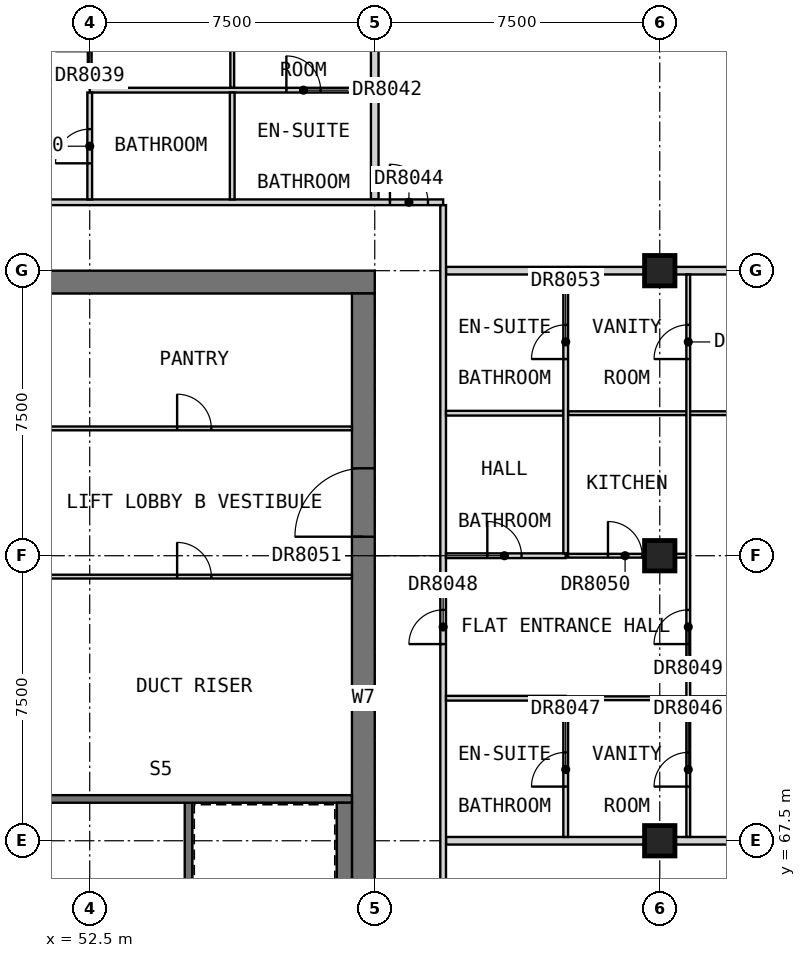
"""IFC4 building model, lengths in metres.
Left out: names, types, materials, properties, quantities, classifications, styles, units other than length and angle.
Written with IfcOpenShell. Run it as: python <this file> out.ifc"""

import sys

from ifc_helpers import new_model, si_unit, direction, frame, frame_2d, origin, origin_2d, place, context, subcontext, project, spatial, rectangle, extrude, element, fill, save


model = new_model("IFC4")
c1 = context("Model", 3, precision=1e-05, world=origin(), true_north=direction((0.0, 1.0)))
c2 = subcontext(c1, "Body", "Model", "MODEL_VIEW")
j1 = project(units=[si_unit("LENGTHUNIT", "METRE"), si_unit("PLANEANGLEUNIT", "RADIAN")], contexts=[c1])
p1 = place(None, origin())
s1 = spatial("IfcSite", under=j1, at=p1, CompositionType="ELEMENT")
p2 = place(p1, origin())
s2 = spatial("IfcBuilding", under=s1, at=p2, CompositionType="ELEMENT")
p3 = place(p2, frame((0.0, 0.0, 233.7)))
s3 = spatial("IfcBuildingStorey", under=s2, at=p3, CompositionType="ELEMENT", Elevation=233.7)
for number, where, z_axis, x_axis in (
    (1, (67.5, 67.5, 0.0), (0.0, 0.0, 1.0), (1.0, 0.0, 0.0)),
    (2, (67.5, 75.0, 0.0), (0.0, 0.0, 1.0), (1.0, 0.0, 0.0)),
    (3, (67.5, 82.5, 0.0), (0.0, 0.0, 1.0), (1.0, 0.0, 0.0)),
):
    element("IfcColumn", number, at=place(p3, frame(where, z_axis=z_axis, x_axis=x_axis)), inside=s3, PredefinedType="COLUMN", context=c2, shape_type="SweptSolid", body=[
        extrude(rectangle(XDim=0.8, YDim=0.8, at=origin_2d()), origin(), (0.0, 0.0, 1.0), 3.5),
    ])
p4 = place(p3, frame((30.0, 82.2, 0.0), z_axis=(0.0, 0.0, 1.0), x_axis=(1.0, 0.0, 0.0)))
e4 = element("IfcWall", 4, at=p4, inside=s3, PredefinedType="SHEAR", context=c2, shape_type="SweptSolid", body=[
    extrude(rectangle(XDim=30.0, YDim=0.6, at=frame_2d((15.0, 0.0))), origin(), (0.0, 0.0, 1.0), 3.5),
])
p5 = place(p3, frame((59.7, 60.6, 0.0), z_axis=(0.0, 0.0, 1.0), x_axis=(0.0, 1.0, 0.0)))
e5 = element("IfcWall", 5, at=p5, inside=s3, PredefinedType="SHEAR", context=c2, shape_type="SweptSolid", body=[
    extrude(rectangle(XDim=21.3, YDim=0.6, at=frame_2d((10.65, 0.0))), origin(), (0.0, 0.0, 1.0), 3.5),
])
p6 = place(p5, frame((14.9, 0.0, 0.0)))
e6 = element("IfcOpeningElement", 6, at=p6, cuts=e5, PredefinedType="OPENING", context=c2, shape_type="SweptSolid", body=[
    extrude(rectangle(XDim=1.8, YDim=2.1, at=frame_2d((0.9, 1.05))), frame((0.0, 0.31, 0.0), z_axis=(0.0, -1.0, 0.0), x_axis=(1.0, 0.0, 0.0)), (0.0, 0.0, 1.0), 0.62),
])
p7 = place(p3, frame((55.1, 60.6, 0.0), z_axis=(0.0, 0.0, 1.0), x_axis=(0.0, 1.0, 0.0)))
e7 = element("IfcWall", 7, at=p7, inside=s3, PredefinedType="SOLIDWALL", context=c2, shape_type="SweptSolid", body=[
    extrude(rectangle(XDim=8.0, YDim=0.2, at=frame_2d((4.0, 0.0))), origin(), (0.0, 0.0, 1.0), 3.25),
])
p8 = place(p3, frame((51.1, 68.6, 0.0), z_axis=(0.0, 0.0, 1.0), x_axis=(1.0, 0.0, 0.0)))
e8 = element("IfcWall", 8, at=p8, inside=s3, PredefinedType="SOLIDWALL", context=c2, shape_type="SweptSolid", body=[
    extrude(rectangle(XDim=8.3, YDim=0.2, at=frame_2d((4.15, 0.0))), origin(), (0.0, 0.0, 1.0), 3.25),
])
p9 = place(p3, frame((59.2, 60.6, 0.0), z_axis=(0.0, 0.0, 1.0), x_axis=(0.0, 1.0, 0.0)))
e9 = element("IfcWall", 9, at=p9, inside=s3, PredefinedType="SOLIDWALL", context=c2, shape_type="SweptSolid", body=[
    extrude(rectangle(XDim=7.9, YDim=0.4, at=frame_2d((3.95, 0.0))), origin(), (0.0, 0.0, 1.0), 3.25),
])
p10 = place(p3, frame((51.1, 74.45, 0.0), z_axis=(0.0, 0.0, 1.0), x_axis=(1.0, 0.0, 0.0)))
e10 = element("IfcWall", 10, at=p10, inside=s3, PredefinedType="PARTITIONING", context=c2, shape_type="SweptSolid", body=[
    extrude(rectangle(XDim=8.3, YDim=0.1, at=frame_2d((4.15, 0.0))), origin(), (0.0, 0.0, 1.0), 3.25),
])
p11 = place(p10, frame((3.7, 0.0, 0.0)))
e11 = element("IfcOpeningElement", 11, at=p11, cuts=e10, PredefinedType="OPENING", context=c2, shape_type="SweptSolid", body=[
    extrude(rectangle(XDim=0.9, YDim=2.1, at=frame_2d((0.45, 1.05))), frame((0.0, 0.06, 0.0), z_axis=(0.0, -1.0, 0.0), x_axis=(1.0, 0.0, 0.0)), (0.0, 0.0, 1.0), 0.12),
])
p12 = place(p3, frame((51.1, 78.35, 0.0), z_axis=(0.0, 0.0, 1.0), x_axis=(1.0, 0.0, 0.0)))
e12 = element("IfcWall", 12, at=p12, inside=s3, PredefinedType="PARTITIONING", context=c2, shape_type="SweptSolid", body=[
    extrude(rectangle(XDim=8.3, YDim=0.1, at=frame_2d((4.15, 0.0))), origin(), (0.0, 0.0, 1.0), 3.25),
])
p13 = place(p12, frame((3.7, 0.0, 0.0)))
e13 = element("IfcOpeningElement", 13, at=p13, cuts=e12, PredefinedType="OPENING", context=c2, shape_type="SweptSolid", body=[
    extrude(rectangle(XDim=0.9, YDim=2.1, at=frame_2d((0.45, 1.05))), frame((0.0, 0.06, 0.0), z_axis=(0.0, -1.0, 0.0), x_axis=(1.0, 0.0, 0.0)), (0.0, 0.0, 1.0), 0.12),
])
for number, where, z_axis, x_axis in (
    (14, (61.875, 67.5, 0.0), (0.0, 0.0, 1.0), (1.0, 0.0, 0.0)),
    (15, (61.875, 82.5, 0.0), (0.0, 0.0, 1.0), (1.0, 0.0, 0.0)),
):
    element("IfcWall", number, at=place(p3, frame(where, z_axis=z_axis, x_axis=x_axis)), inside=s3, PredefinedType="PARTITIONING", context=c2, shape_type="SweptSolid", body=[
        extrude(rectangle(XDim=16.875, YDim=0.2, at=frame_2d((8.438, 0.0))), origin(), (0.0, 0.0, 1.0), 3.25),
    ])
p14 = place(p3, frame((60.0, 84.375, 0.0), z_axis=(0.0, 0.0, 1.0), x_axis=(0.0, 1.0, 0.0)))
e16 = element("IfcWall", 16, at=p14, inside=s3, PredefinedType="PARTITIONING", context=c2, shape_type="SweptSolid", body=[
    extrude(rectangle(XDim=13.125, YDim=0.2, at=frame_2d((6.562, 0.0))), origin(), (0.0, 0.0, 1.0), 3.25),
])
p15 = place(p3, frame((33.85, 84.3, 0.0), z_axis=(0.0, 0.0, 1.0), x_axis=(1.0, 0.0, 0.0)))
e17 = element("IfcWall", 17, at=p15, inside=s3, PredefinedType="PARTITIONING", context=c2, shape_type="SweptSolid", body=[
    extrude(rectangle(XDim=27.95, YDim=0.15, at=frame_2d((13.975, 0.0))), origin(), (0.0, 0.0, 1.0), 3.25),
])
p16 = place(p15, frame((1.325, 0.0, 0.0)))
e18 = element("IfcOpeningElement", 18, at=p16, cuts=e17, PredefinedType="OPENING", context=c2, shape_type="SweptSolid", body=[
    extrude(rectangle(XDim=0.9, YDim=2.1, at=frame_2d((0.45, 1.05))), frame((0.0, 0.085, 0.0), z_axis=(0.0, -1.0, 0.0), x_axis=(1.0, 0.0, 0.0)), (0.0, 0.0, 1.0), 0.17),
])
p17 = place(p15, frame((8.825, 0.0, 0.0)))
e19 = element("IfcOpeningElement", 19, at=p17, cuts=e17, PredefinedType="OPENING", context=c2, shape_type="SweptSolid", body=[
    extrude(rectangle(XDim=0.9, YDim=2.1, at=frame_2d((0.45, 1.05))), frame((0.0, 0.085, 0.0), z_axis=(0.0, -1.0, 0.0), x_axis=(1.0, 0.0, 0.0)), (0.0, 0.0, 1.0), 0.17),
])
p18 = place(p15, frame((16.325, 0.0, 0.0)))
e20 = element("IfcOpeningElement", 20, at=p18, cuts=e17, PredefinedType="OPENING", context=c2, shape_type="SweptSolid", body=[
    extrude(rectangle(XDim=0.9, YDim=2.1, at=frame_2d((0.45, 1.05))), frame((0.0, 0.085, 0.0), z_axis=(0.0, -1.0, 0.0), x_axis=(1.0, 0.0, 0.0)), (0.0, 0.0, 1.0), 0.17),
])
p19 = place(p15, frame((26.55, 0.0, 0.0)))
e21 = element("IfcOpeningElement", 21, at=p19, cuts=e17, PredefinedType="OPENING", context=c2, shape_type="SweptSolid", body=[
    extrude(rectangle(XDim=1.0, YDim=2.1, at=frame_2d((0.5, 1.05))), frame((0.0, 0.085, 0.0), z_axis=(0.0, -1.0, 0.0), x_axis=(1.0, 0.0, 0.0)), (0.0, 0.0, 1.0), 0.17),
])
p20 = place(p3, frame((61.8, 58.275, 0.0), z_axis=(0.0, 0.0, 1.0), x_axis=(0.0, 1.0, 0.0)))
e22 = element("IfcWall", 22, at=p20, inside=s3, PredefinedType="PARTITIONING", context=c2, shape_type="SweptSolid", body=[
    extrude(rectangle(XDim=25.95, YDim=0.15, at=frame_2d((12.975, 0.0))), origin(), (0.0, 0.0, 1.0), 3.25),
])
p21 = place(p20, frame((4.575, 0.0, 0.0)))
e23 = element("IfcOpeningElement", 23, at=p21, cuts=e22, PredefinedType="OPENING", context=c2, shape_type="SweptSolid", body=[
    extrude(rectangle(XDim=1.8, YDim=2.1, at=frame_2d((0.9, 1.05))), frame((0.0, 0.085, 0.0), z_axis=(0.0, -1.0, 0.0), x_axis=(1.0, 0.0, 0.0)), (0.0, 0.0, 1.0), 0.17),
])
p22 = place(p20, frame((14.4, 0.0, 0.0)))
e24 = element("IfcOpeningElement", 24, at=p22, cuts=e22, PredefinedType="OPENING", context=c2, shape_type="SweptSolid", body=[
    extrude(rectangle(XDim=0.9, YDim=2.1, at=frame_2d((0.45, 1.05))), frame((0.0, 0.085, 0.0), z_axis=(0.0, -1.0, 0.0), x_axis=(1.0, 0.0, 0.0)), (0.0, 0.0, 1.0), 0.17),
])
p23 = place(p3, frame((65.087, 71.25, 0.0), z_axis=(0.0, 0.0, 1.0), x_axis=(1.0, 0.0, 0.0)))
e25 = element("IfcWall", 25, at=p23, inside=s3, PredefinedType="PARTITIONING", context=c2, shape_type="SweptSolid", body=[
    extrude(rectangle(XDim=12.853, YDim=0.1, at=frame_2d((6.426, 0.0))), origin(), (0.0, 0.0, 1.0), 3.25),
])
p24 = place(p23, frame((7.962, 0.0, 0.0)))
e26 = element("IfcOpeningElement", 26, at=p24, cuts=e25, PredefinedType="OPENING", context=c2, shape_type="SweptSolid", body=[
    extrude(rectangle(XDim=0.9, YDim=2.1, at=frame_2d((0.45, 1.05))), frame((0.0, 0.06, 0.0), z_axis=(0.0, -1.0, 0.0), x_axis=(1.0, 0.0, 0.0)), (0.0, 0.0, 1.0), 0.12),
])
p25 = place(p3, frame((65.087, 75.0, 0.0), z_axis=(0.0, 0.0, 1.0), x_axis=(1.0, 0.0, 0.0)))
e27 = element("IfcWall", 27, at=p25, inside=s3, PredefinedType="PARTITIONING", context=c2, shape_type="SweptSolid", body=[
    extrude(rectangle(XDim=3.113, YDim=0.1, at=frame_2d((1.556, 0.0))), origin(), (0.0, 0.0, 1.0), 3.25),
])
p26 = place(p25, frame((1.05, 0.0, 0.0)))
e28 = element("IfcOpeningElement", 28, at=p26, cuts=e27, PredefinedType="OPENING", context=c2, shape_type="SweptSolid", body=[
    extrude(rectangle(XDim=0.9, YDim=2.1, at=frame_2d((0.45, 1.05))), frame((0.0, 0.06, 0.0), z_axis=(0.0, -1.0, 0.0), x_axis=(1.0, 0.0, 0.0)), (0.0, 0.0, 1.0), 0.12),
])
p27 = place(p3, frame((65.087, 78.75, 0.0), z_axis=(0.0, 0.0, 1.0), x_axis=(1.0, 0.0, 0.0)))
e29 = element("IfcWall", 29, at=p27, inside=s3, PredefinedType="PARTITIONING", context=c2, shape_type="SweptSolid", body=[
    extrude(rectangle(XDim=12.853, YDim=0.1, at=frame_2d((6.426, 0.0))), origin(), (0.0, 0.0, 1.0), 3.25),
])
p28 = place(p27, frame((7.962, 0.0, 0.0)))
e30 = element("IfcOpeningElement", 30, at=p28, cuts=e29, PredefinedType="OPENING", context=c2, shape_type="SweptSolid", body=[
    extrude(rectangle(XDim=0.9, YDim=2.1, at=frame_2d((0.45, 1.05))), frame((0.0, 0.06, 0.0), z_axis=(0.0, -1.0, 0.0), x_axis=(1.0, 0.0, 0.0)), (0.0, 0.0, 1.0), 0.12),
])
p29 = place(p3, frame((52.5, 87.312, 0.0), z_axis=(0.0, 0.0, 1.0), x_axis=(0.0, 1.0, 0.0)))
e31 = element("IfcWall", 31, at=p29, inside=s3, PredefinedType="PARTITIONING", context=c2, shape_type="SweptSolid", body=[
    extrude(rectangle(XDim=2.837, YDim=0.1, at=frame_2d((1.419, 0.0))), origin(), (0.0, 0.0, 1.0), 3.25),
])
p30 = place(p29, frame((0.962, 0.0, 0.0)))
e32 = element("IfcOpeningElement", 32, at=p30, cuts=e31, PredefinedType="OPENING", context=c2, shape_type="SweptSolid", body=[
    extrude(rectangle(XDim=0.9, YDim=2.1, at=frame_2d((0.45, 1.05))), frame((0.0, 0.06, 0.0), z_axis=(0.0, -1.0, 0.0), x_axis=(1.0, 0.0, 0.0)), (0.0, 0.0, 1.0), 0.12),
])
p31 = place(p3, frame((56.25, 87.312, 0.0), z_axis=(0.0, 0.0, 1.0), x_axis=(0.0, 1.0, 0.0)))
e33 = element("IfcWall", 33, at=p31, inside=s3, PredefinedType="PARTITIONING", context=c2, shape_type="SweptSolid", body=[
    extrude(rectangle(XDim=9.377, YDim=0.1, at=frame_2d((4.689, 0.0))), origin(), (0.0, 0.0, 1.0), 3.25),
])
p32 = place(p31, frame((6.087, 0.0, 0.0)))
e34 = element("IfcOpeningElement", 34, at=p32, cuts=e33, PredefinedType="OPENING", context=c2, shape_type="SweptSolid", body=[
    extrude(rectangle(XDim=0.9, YDim=2.1, at=frame_2d((0.45, 1.05))), frame((0.0, 0.06, 0.0), z_axis=(0.0, -1.0, 0.0), x_axis=(1.0, 0.0, 0.0)), (0.0, 0.0, 1.0), 0.12),
])
p33 = place(p3, frame((68.25, 67.6, 0.0), z_axis=(0.0, 0.0, 1.0), x_axis=(0.0, 1.0, 0.0)))
e35 = element("IfcWall", 35, at=p33, inside=s3, PredefinedType="PARTITIONING", context=c2, shape_type="SweptSolid", body=[
    extrude(rectangle(XDim=14.8, YDim=0.1, at=frame_2d((7.4, 0.0))), origin(), (0.0, 0.0, 1.0), 3.25),
])
p34 = place(p33, frame((1.325, 0.0, 0.0)))
e36 = element("IfcOpeningElement", 36, at=p34, cuts=e35, PredefinedType="OPENING", context=c2, shape_type="SweptSolid", body=[
    extrude(rectangle(XDim=0.9, YDim=2.1, at=frame_2d((0.45, 1.05))), frame((0.0, 0.06, 0.0), z_axis=(0.0, -1.0, 0.0), x_axis=(1.0, 0.0, 0.0)), (0.0, 0.0, 1.0), 0.12),
])
p35 = place(p33, frame((5.075, 0.0, 0.0)))
e37 = element("IfcOpeningElement", 37, at=p35, cuts=e35, PredefinedType="OPENING", context=c2, shape_type="SweptSolid", body=[
    extrude(rectangle(XDim=0.9, YDim=2.1, at=frame_2d((0.45, 1.05))), frame((0.0, 0.06, 0.0), z_axis=(0.0, -1.0, 0.0), x_axis=(1.0, 0.0, 0.0)), (0.0, 0.0, 1.0), 0.12),
])
p36 = place(p33, frame((12.575, 0.0, 0.0)))
e38 = element("IfcOpeningElement", 38, at=p36, cuts=e35, PredefinedType="OPENING", context=c2, shape_type="SweptSolid", body=[
    extrude(rectangle(XDim=0.9, YDim=2.1, at=frame_2d((0.45, 1.05))), frame((0.0, 0.06, 0.0), z_axis=(0.0, -1.0, 0.0), x_axis=(1.0, 0.0, 0.0)), (0.0, 0.0, 1.0), 0.12),
])
p37 = place(p3, frame((61.875, 71.25, 0.0), z_axis=(0.0, 0.0, 1.0), x_axis=(1.0, 0.0, 0.0)))
e39 = element("IfcWall", 39, at=p37, inside=s3, PredefinedType="PARTITIONING", context=c2, shape_type="SweptSolid", body=[
    extrude(rectangle(XDim=3.15, YDim=0.125, at=frame_2d((1.575, 0.0))), origin(), (0.0, 0.0, 1.0), 3.25),
])
p38 = place(p3, frame((61.875, 75.0, 0.0), z_axis=(0.0, 0.0, 1.0), x_axis=(1.0, 0.0, 0.0)))
e40 = element("IfcWall", 40, at=p38, inside=s3, PredefinedType="PARTITIONING", context=c2, shape_type="SweptSolid", body=[
    extrude(rectangle(XDim=3.15, YDim=0.125, at=frame_2d((1.575, 0.0))), origin(), (0.0, 0.0, 1.0), 3.25),
])
p39 = place(p38, frame((1.087, 0.0, 0.0)))
e41 = element("IfcOpeningElement", 41, at=p39, cuts=e40, PredefinedType="OPENING", context=c2, shape_type="SweptSolid", body=[
    extrude(rectangle(XDim=0.9, YDim=2.1, at=frame_2d((0.45, 1.05))), frame((0.0, 0.073, 0.0), z_axis=(0.0, -1.0, 0.0), x_axis=(1.0, 0.0, 0.0)), (0.0, 0.0, 1.0), 0.145),
])
p40 = place(p3, frame((61.875, 78.75, 0.0), z_axis=(0.0, 0.0, 1.0), x_axis=(1.0, 0.0, 0.0)))
e42 = element("IfcWall", 42, at=p40, inside=s3, PredefinedType="PARTITIONING", context=c2, shape_type="SweptSolid", body=[
    extrude(rectangle(XDim=3.087, YDim=0.125, at=frame_2d((1.544, 0.0))), origin(), (0.0, 0.0, 1.0), 3.25),
])
p41 = place(p3, frame((52.5, 87.25, 0.0), z_axis=(0.0, 0.0, 1.0), x_axis=(1.0, 0.0, 0.0)))
e43 = element("IfcWall", 43, at=p41, inside=s3, PredefinedType="PARTITIONING", context=c2, shape_type="SweptSolid", body=[
    extrude(rectangle(XDim=7.4, YDim=0.125, at=frame_2d((3.7, 0.0))), origin(), (0.0, 0.0, 1.0), 3.25),
])
p42 = place(p41, frame((5.175, 0.0, 0.0)))
e44 = element("IfcOpeningElement", 44, at=p42, cuts=e43, PredefinedType="OPENING", context=c2, shape_type="SweptSolid", body=[
    extrude(rectangle(XDim=0.9, YDim=2.1, at=frame_2d((0.45, 1.05))), frame((0.0, 0.073, 0.0), z_axis=(0.0, -1.0, 0.0), x_axis=(1.0, 0.0, 0.0)), (0.0, 0.0, 1.0), 0.145),
])
p43 = place(p3, frame((52.5, 84.375, 0.0), z_axis=(0.0, 0.0, 1.0), x_axis=(0.0, 1.0, 0.0)))
e45 = element("IfcWall", 45, at=p43, inside=s3, PredefinedType="PARTITIONING", context=c2, shape_type="SweptSolid", body=[
    extrude(rectangle(XDim=2.812, YDim=0.125, at=frame_2d((1.406, 0.0))), origin(), (0.0, 0.0, 1.0), 3.25),
])
p44 = place(p43, frame((0.95, 0.0, 0.0)))
e46 = element("IfcOpeningElement", 46, at=p44, cuts=e45, PredefinedType="OPENING", context=c2, shape_type="SweptSolid", body=[
    extrude(rectangle(XDim=0.9, YDim=2.1, at=frame_2d((0.45, 1.05))), frame((0.0, 0.073, 0.0), z_axis=(0.0, -1.0, 0.0), x_axis=(1.0, 0.0, 0.0)), (0.0, 0.0, 1.0), 0.145),
])
p45 = place(p3, frame((56.25, 84.375, 0.0), z_axis=(0.0, 0.0, 1.0), x_axis=(0.0, 1.0, 0.0)))
e47 = element("IfcWall", 47, at=p45, inside=s3, PredefinedType="PARTITIONING", context=c2, shape_type="SweptSolid", body=[
    extrude(rectangle(XDim=2.812, YDim=0.125, at=frame_2d((1.406, 0.0))), origin(), (0.0, 0.0, 1.0), 3.25),
])
p46 = place(p3, frame((65.025, 67.6, 0.0), z_axis=(0.0, 0.0, 1.0), x_axis=(0.0, 1.0, 0.0)))
e48 = element("IfcWall", 48, at=p46, inside=s3, PredefinedType="PARTITIONING", context=c2, shape_type="SweptSolid", body=[
    extrude(rectangle(XDim=3.587, YDim=0.125, at=frame_2d((1.794, 0.0))), origin(), (0.0, 0.0, 1.0), 3.25),
])
p47 = place(p46, frame((1.325, 0.0, 0.0)))
e49 = element("IfcOpeningElement", 49, at=p47, cuts=e48, PredefinedType="OPENING", context=c2, shape_type="SweptSolid", body=[
    extrude(rectangle(XDim=0.9, YDim=2.1, at=frame_2d((0.45, 1.05))), frame((0.0, 0.073, 0.0), z_axis=(0.0, -1.0, 0.0), x_axis=(1.0, 0.0, 0.0)), (0.0, 0.0, 1.0), 0.145),
])
p48 = place(p3, frame((65.025, 75.062, 0.0), z_axis=(0.0, 0.0, 1.0), x_axis=(0.0, 1.0, 0.0)))
e50 = element("IfcWall", 50, at=p48, inside=s3, PredefinedType="PARTITIONING", context=c2, shape_type="SweptSolid", body=[
    extrude(rectangle(XDim=7.337, YDim=0.125, at=frame_2d((3.669, 0.0))), origin(), (0.0, 0.0, 1.0), 3.25),
])
p49 = place(p48, frame((5.113, 0.0, 0.0)))
e51 = element("IfcOpeningElement", 51, at=p49, cuts=e50, PredefinedType="OPENING", context=c2, shape_type="SweptSolid", body=[
    extrude(rectangle(XDim=0.9, YDim=2.1, at=frame_2d((0.45, 1.05))), frame((0.0, 0.073, 0.0), z_axis=(0.0, -1.0, 0.0), x_axis=(1.0, 0.0, 0.0)), (0.0, 0.0, 1.0), 0.145),
])
p50 = place(p6, origin())
e52 = element("IfcDoor", 52, at=p50, inside=s3, OperationType="DOUBLE_DOOR_SINGLE_SWING", PredefinedType="DOOR", context=c2, shape_type="SweptSolid", body=[
    extrude(rectangle(XDim=1.8, YDim=2.1, at=frame_2d((0.9, 1.05))), frame((0.0, 0.025, 0.0), z_axis=(0.0, -1.0, 0.0), x_axis=(1.0, 0.0, 0.0)), (0.0, 0.0, 1.0), 0.05),
])
fill(e6, e52)
p51 = place(p11, origin())
e53 = element("IfcDoor", 53, at=p51, inside=s3, OperationType="SINGLE_SWING_RIGHT", PredefinedType="DOOR", context=c2, shape_type="SweptSolid", body=[
    extrude(rectangle(XDim=0.9, YDim=2.1, at=frame_2d((0.45, 1.05))), frame((0.0, 0.025, 0.0), z_axis=(0.0, -1.0, 0.0), x_axis=(1.0, 0.0, 0.0)), (0.0, 0.0, 1.0), 0.05),
])
fill(e11, e53)
p52 = place(p13, origin())
e54 = element("IfcDoor", 54, at=p52, inside=s3, OperationType="SINGLE_SWING_RIGHT", PredefinedType="DOOR", context=c2, shape_type="SweptSolid", body=[
    extrude(rectangle(XDim=0.9, YDim=2.1, at=frame_2d((0.45, 1.05))), frame((0.0, 0.025, 0.0), z_axis=(0.0, -1.0, 0.0), x_axis=(1.0, 0.0, 0.0)), (0.0, 0.0, 1.0), 0.05),
])
fill(e13, e54)
p53 = place(p44, origin())
e55 = element("IfcDoor", 55, at=p53, inside=s3, OperationType="SINGLE_SWING_RIGHT", PredefinedType="DOOR", context=c2, shape_type="SweptSolid", body=[
    extrude(rectangle(XDim=0.9, YDim=2.1, at=frame_2d((0.45, 1.05))), frame((0.0, 0.025, 0.0), z_axis=(0.0, -1.0, 0.0), x_axis=(1.0, 0.0, 0.0)), (0.0, 0.0, 1.0), 0.05),
])
fill(e46, e55)
p54 = place(p42, origin())
e56 = element("IfcDoor", 56, at=p54, inside=s3, OperationType="SINGLE_SWING_RIGHT", PredefinedType="DOOR", context=c2, shape_type="SweptSolid", body=[
    extrude(rectangle(XDim=0.9, YDim=2.1, at=frame_2d((0.45, 1.05))), frame((0.0, 0.025, 0.0), z_axis=(0.0, -1.0, 0.0), x_axis=(1.0, 0.0, 0.0)), (0.0, 0.0, 1.0), 0.05),
])
fill(e44, e56)
p55 = place(p19, origin())
e57 = element("IfcDoor", 57, at=p55, inside=s3, OperationType="SINGLE_SWING_LEFT", PredefinedType="DOOR", context=c2, shape_type="SweptSolid", body=[
    extrude(rectangle(XDim=1.0, YDim=2.1, at=frame_2d((0.5, 1.05))), frame((0.0, 0.025, 0.0), z_axis=(0.0, -1.0, 0.0), x_axis=(1.0, 0.0, 0.0)), (0.0, 0.0, 1.0), 0.05),
])
fill(e21, e57)
p56 = place(p34, origin())
e58 = element("IfcDoor", 58, at=p56, inside=s3, OperationType="SINGLE_SWING_LEFT", PredefinedType="DOOR", context=c2, shape_type="SweptSolid", body=[
    extrude(rectangle(XDim=0.9, YDim=2.1, at=frame_2d((0.45, 1.05))), frame((0.0, 0.025, 0.0), z_axis=(0.0, -1.0, 0.0), x_axis=(1.0, 0.0, 0.0)), (0.0, 0.0, 1.0), 0.05),
])
fill(e36, e58)
p57 = place(p47, origin())
e59 = element("IfcDoor", 59, at=p57, inside=s3, OperationType="SINGLE_SWING_LEFT", PredefinedType="DOOR", context=c2, shape_type="SweptSolid", body=[
    extrude(rectangle(XDim=0.9, YDim=2.1, at=frame_2d((0.45, 1.05))), frame((0.0, 0.025, 0.0), z_axis=(0.0, -1.0, 0.0), x_axis=(1.0, 0.0, 0.0)), (0.0, 0.0, 1.0), 0.05),
])
fill(e49, e59)
p58 = place(p22, origin())
e60 = element("IfcDoor", 60, at=p58, inside=s3, OperationType="SINGLE_SWING_RIGHT", PredefinedType="DOOR", context=c2, shape_type="SweptSolid", body=[
    extrude(rectangle(XDim=0.9, YDim=2.1, at=frame_2d((0.45, 1.05))), frame((0.0, 0.025, 0.0), z_axis=(0.0, -1.0, 0.0), x_axis=(1.0, 0.0, 0.0)), (0.0, 0.0, 1.0), 0.05),
])
fill(e24, e60)
p59 = place(p35, origin())
e61 = element("IfcDoor", 61, at=p59, inside=s3, OperationType="SINGLE_SWING_LEFT", PredefinedType="DOOR", context=c2, shape_type="SweptSolid", body=[
    extrude(rectangle(XDim=0.9, YDim=2.1, at=frame_2d((0.45, 1.05))), frame((0.0, 0.025, 0.0), z_axis=(0.0, -1.0, 0.0), x_axis=(1.0, 0.0, 0.0)), (0.0, 0.0, 1.0), 0.05),
])
fill(e37, e61)
p60 = place(p26, origin())
e62 = element("IfcDoor", 62, at=p60, inside=s3, OperationType="SINGLE_SWING_LEFT", PredefinedType="DOOR", context=c2, shape_type="SweptSolid", body=[
    extrude(rectangle(XDim=0.9, YDim=2.1, at=frame_2d((0.45, 1.05))), frame((0.0, 0.025, 0.0), z_axis=(0.0, -1.0, 0.0), x_axis=(1.0, 0.0, 0.0)), (0.0, 0.0, 1.0), 0.05),
])
fill(e28, e62)
p61 = place(p39, origin())
e63 = element("IfcDoor", 63, at=p61, inside=s3, OperationType="SINGLE_SWING_RIGHT", PredefinedType="DOOR", context=c2, shape_type="SweptSolid", body=[
    extrude(rectangle(XDim=0.9, YDim=2.1, at=frame_2d((0.45, 1.05))), frame((0.0, 0.025, 0.0), z_axis=(0.0, -1.0, 0.0), x_axis=(1.0, 0.0, 0.0)), (0.0, 0.0, 1.0), 0.05),
])
fill(e41, e63)
p62 = place(p36, origin())
e64 = element("IfcDoor", 64, at=p62, inside=s3, OperationType="SINGLE_SWING_LEFT", PredefinedType="DOOR", context=c2, shape_type="SweptSolid", body=[
    extrude(rectangle(XDim=0.9, YDim=2.1, at=frame_2d((0.45, 1.05))), frame((0.0, 0.025, 0.0), z_axis=(0.0, -1.0, 0.0), x_axis=(1.0, 0.0, 0.0)), (0.0, 0.0, 1.0), 0.05),
])
fill(e38, e64)
p63 = place(p49, origin())
e65 = element("IfcDoor", 65, at=p63, inside=s3, OperationType="SINGLE_SWING_LEFT", PredefinedType="DOOR", context=c2, shape_type="SweptSolid", body=[
    extrude(rectangle(XDim=0.9, YDim=2.1, at=frame_2d((0.45, 1.05))), frame((0.0, 0.025, 0.0), z_axis=(0.0, -1.0, 0.0), x_axis=(1.0, 0.0, 0.0)), (0.0, 0.0, 1.0), 0.05),
])
fill(e51, e65)
save(model, sys.argv[1])
